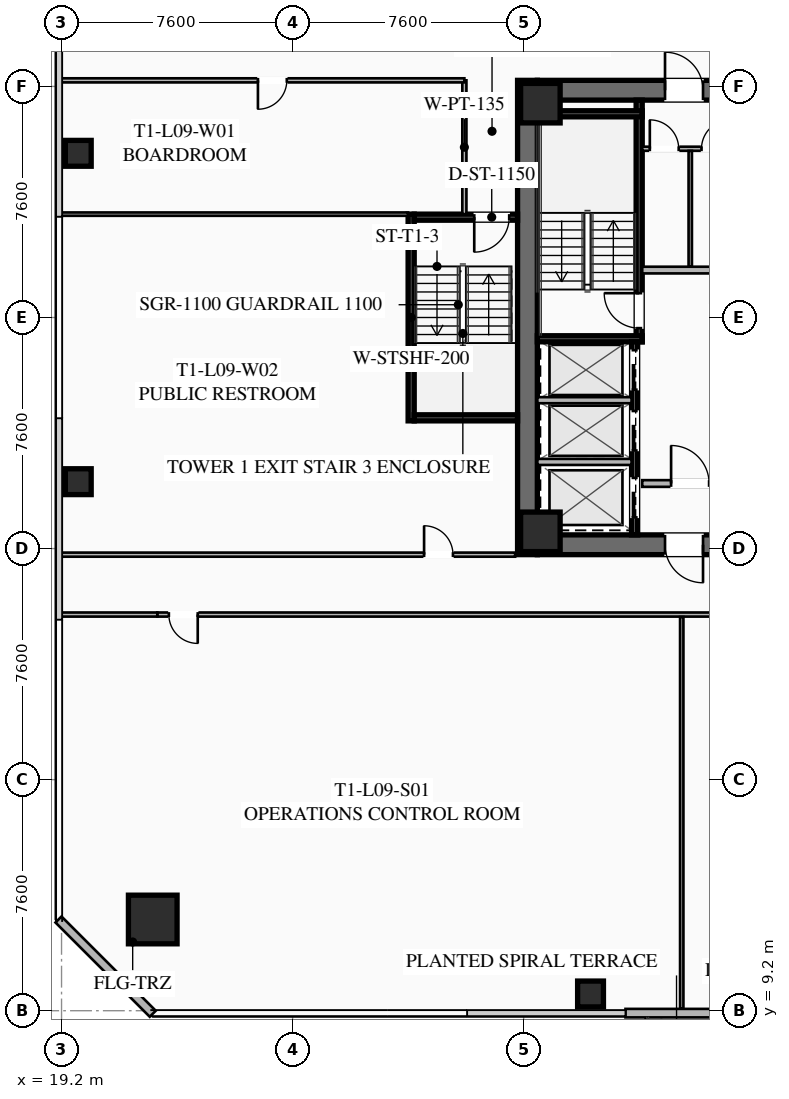
"""IFC4 building model, lengths in metres.
Left out: names, types, materials, properties, quantities, classifications, styles, units other than length and angle.
Written with IfcOpenShell. Run it as: python <this file> out.ifc"""

import sys

from ifc_helpers import new_model, si_unit, direction, frame, frame_2d, origin, origin_2d, place, context, subcontext, project, spatial, rectangle, hollow_rectangle, extrude, element, fill, save


model = new_model("IFC4")
c1 = context("Model", 3, precision=1e-05, world=origin(), true_north=direction((0.0, 1.0)))
c2 = subcontext(c1, "Body", "Model", "MODEL_VIEW")
j1 = project(units=[si_unit("LENGTHUNIT", "METRE"), si_unit("PLANEANGLEUNIT", "RADIAN")], contexts=[c1])
p1 = place(None, origin())
s1 = spatial("IfcSite", under=j1, at=p1, CompositionType="ELEMENT")
p2 = place(p1, origin())
s2 = spatial("IfcBuilding", under=s1, at=p2, CompositionType="ELEMENT")
p3 = place(p2, frame((0.0, 0.0, 38.8)))
s3 = spatial("IfcBuildingStorey", under=s2, at=p3, CompositionType="ELEMENT", Elevation=38.8)
p4 = place(p3, frame((34.525, 24.2, 0.0), z_axis=(0.0, 0.0, 1.0), x_axis=(0.0, 1.0, 0.0)))
e1 = element("IfcWall", 1, at=p4, inside=s3, PredefinedType="SHEAR", context=c2, shape_type="SweptSolid", body=[
    extrude(rectangle(XDim=15.6, YDim=0.65, at=frame_2d((7.8, 0.0))), origin(), (0.0, 0.0, 1.0), 3.55),
])
p5 = place(p3, frame((49.15, 24.525, 0.0), z_axis=(0.0, 0.0, 1.0), x_axis=(-1.0, 0.0, 0.0)))
e2 = element("IfcWall", 2, at=p5, inside=s3, PredefinedType="SHEAR", context=c2, shape_type="SweptSolid", body=[
    extrude(rectangle(XDim=14.3, YDim=0.65, at=frame_2d((7.15, 0.0))), origin(), (0.0, 0.0, 1.0), 3.55),
])
p6 = place(p5, frame((8.85, 0.0, 0.0)))
e3 = element("IfcOpeningElement", 3, at=p6, cuts=e2, PredefinedType="OPENING", context=c2, shape_type="SweptSolid", body=[
    extrude(rectangle(XDim=1.25, YDim=2.25, at=frame_2d((0.625, 1.125))), frame((0.0, 0.335, 0.0), z_axis=(0.0, -1.0, 0.0), x_axis=(1.0, 0.0, 0.0)), (0.0, 0.0, 1.0), 0.67),
])
p7 = place(p5, frame((3.8, 0.0, 0.0)))
e4 = element("IfcOpeningElement", 4, at=p7, cuts=e2, PredefinedType="OPENING", context=c2, shape_type="SweptSolid", body=[
    extrude(rectangle(XDim=1.25, YDim=2.25, at=frame_2d((0.625, 1.125))), frame((0.0, 0.335, 0.0), z_axis=(0.0, -1.0, 0.0), x_axis=(1.0, 0.0, 0.0)), (0.0, 0.0, 1.0), 0.67),
])
p8 = place(p3, frame((34.85, 39.475, 0.0), z_axis=(0.0, 0.0, 1.0), x_axis=(1.0, 0.0, 0.0)))
e5 = element("IfcWall", 5, at=p8, inside=s3, PredefinedType="SHEAR", context=c2, shape_type="SweptSolid", body=[
    extrude(rectangle(XDim=14.3, YDim=0.65, at=frame_2d((7.15, 0.0))), origin(), (0.0, 0.0, 1.0), 3.55),
])
p9 = place(p8, frame((4.2, 0.0, 0.0)))
e6 = element("IfcOpeningElement", 6, at=p9, cuts=e5, PredefinedType="OPENING", context=c2, shape_type="SweptSolid", body=[
    extrude(rectangle(XDim=1.25, YDim=2.25, at=frame_2d((0.625, 1.125))), frame((0.0, 0.335, 0.0), z_axis=(0.0, -1.0, 0.0), x_axis=(1.0, 0.0, 0.0)), (0.0, 0.0, 1.0), 0.67),
])
p10 = place(p8, frame((9.25, 0.0, 0.0)))
e7 = element("IfcOpeningElement", 7, at=p10, cuts=e5, PredefinedType="OPENING", context=c2, shape_type="SweptSolid", body=[
    extrude(rectangle(XDim=1.25, YDim=2.25, at=frame_2d((0.625, 1.125))), frame((0.0, 0.335, 0.0), z_axis=(0.0, -1.0, 0.0), x_axis=(1.0, 0.0, 0.0)), (0.0, 0.0, 1.0), 0.67),
])
for number, where, z_axis, x_axis in (
    (8, (34.95, 24.95, 0.0), (0.0, 0.0, 1.0), (1.0, 0.0, 0.0)),
    (9, (34.95, 39.05, 0.0), (0.0, 0.0, 1.0), (1.0, 0.0, 0.0)),
):
    element("IfcColumn", number, at=place(p3, frame(where, z_axis=z_axis, x_axis=x_axis)), inside=s3, PredefinedType="COLUMN", context=c2, shape_type="SweptSolid", body=[
        extrude(hollow_rectangle(XDim=1.3, YDim=1.3, WallThickness=0.05, at=origin_2d()), origin(), (0.0, 0.0, 1.0), 3.35),
    ])
p11 = place(p3, frame((22.2, 12.2, 0.0), z_axis=(0.0, 0.0, 1.0), x_axis=(1.0, 0.0, 0.0)))
e10 = element("IfcColumn", 10, at=p11, inside=s3, PredefinedType="COLUMN", context=c2, shape_type="SweptSolid", body=[
    extrude(hollow_rectangle(XDim=1.6, YDim=1.6, WallThickness=0.06, at=origin_2d()), origin(), (0.0, 0.0, 1.0), 3.35),
])
for number, where, z_axis, x_axis in (
    (11, (36.6, 9.75, 0.0), (0.0, 0.0, 1.0), (1.0, 0.0, 0.0)),
    (12, (19.75, 37.4, 0.0), (0.0, 0.0, 1.0), (1.0, 0.0, 0.0)),
    (13, (19.75, 26.6, 0.0), (0.0, 0.0, 1.0), (1.0, 0.0, 0.0)),
):
    element("IfcColumn", number, at=place(p3, frame(where, z_axis=z_axis, x_axis=x_axis)), inside=s3, PredefinedType="COLUMN", context=c2, shape_type="SweptSolid", body=[
        extrude(hollow_rectangle(XDim=0.85, YDim=0.85, WallThickness=0.035, at=origin_2d()), origin(), (0.0, 0.0, 1.0), 3.35),
    ])
p12 = place(p3, frame((46.25, 9.12, 0.0), z_axis=(0.0, 0.0, 1.0), x_axis=(-1.0, 0.0, 0.0)))
e14 = element("IfcWall", 14, at=p12, inside=s3, PredefinedType="SOLIDWALL", context=c2, shape_type="SweptSolid", body=[
    extrude(rectangle(XDim=8.5, YDim=0.28, at=frame_2d((4.25, 0.0))), origin(), (0.0, 0.0, 1.0), 3.35),
])
p13 = place(p12, frame((3.6, 0.0, 0.0)))
e15 = element("IfcOpeningElement", 15, at=p13, cuts=e14, PredefinedType="OPENING", context=c2, shape_type="SweptSolid", body=[
    extrude(rectangle(XDim=1.3, YDim=2.15, at=frame_2d((0.65, 1.075))), frame((0.0, 0.15, 0.0), z_axis=(0.0, -1.0, 0.0), x_axis=(1.0, 0.0, 0.0)), (0.0, 0.0, 1.0), 0.3),
])
p14 = place(p12, frame((1.46, 0.0, 0.85)))
e16 = element("IfcOpeningElement", 16, at=p14, cuts=e14, PredefinedType="OPENING", context=c2, shape_type="SweptSolid", body=[
    extrude(rectangle(XDim=1.8, YDim=1.92, at=frame_2d((0.9, 0.96))), frame((0.0, 0.15, 0.0), z_axis=(0.0, -1.0, 0.0), x_axis=(1.0, 0.0, 0.0)), (0.0, 0.0, 1.0), 0.3),
])
p15 = place(p3, frame((22.2, 9.1, 0.0), z_axis=(0.0, 0.0, 1.0), x_axis=(-0.707106781187, 0.707106781187, 0.0)))
e17 = element("IfcWall", 17, at=p15, inside=s3, PredefinedType="SOLIDWALL", context=c2, shape_type="SweptSolid", body=[
    extrude(rectangle(XDim=4.384, YDim=0.28, at=frame_2d((2.192, 0.0))), origin(), (0.0, 0.0, 1.0), 3.35),
])
p16 = place(p3, frame((38.2, 31.2, 0.0), z_axis=(0.0, 0.0, 1.0), x_axis=(0.0, 1.0, 0.0)))
e18 = element("IfcWall", 18, at=p16, inside=s3, PredefinedType="SHEAR", context=c2, shape_type="SweptSolid", body=[
    extrude(rectangle(XDim=7.95, YDim=0.2, at=frame_2d((3.975, 0.0))), origin(), (0.0, 0.0, 1.0), 3.35),
])
p17 = place(p16, frame((0.45, 0.0, 0.0)))
e19 = element("IfcOpeningElement", 19, at=p17, cuts=e18, PredefinedType="OPENING", context=c2, shape_type="SweptSolid", body=[
    extrude(rectangle(XDim=1.15, YDim=2.2, at=frame_2d((0.575, 1.1))), frame((0.0, 0.11, 0.0), z_axis=(0.0, -1.0, 0.0), x_axis=(1.0, 0.0, 0.0)), (0.0, 0.0, 1.0), 0.22),
])
for number, where, z_axis, x_axis in (
    (20, (34.85, 31.3, 0.0), (0.0, 0.0, 1.0), (1.0, 0.0, 0.0)),
    (21, (34.85, 38.7, 0.0), (0.0, 0.0, 1.0), (1.0, 0.0, 0.0)),
):
    element("IfcWall", number, at=place(p3, frame(where, z_axis=z_axis, x_axis=x_axis)), inside=s3, PredefinedType="SHEAR", context=c2, shape_type="SweptSolid", body=[
        extrude(rectangle(XDim=3.45, YDim=0.2, at=frame_2d((1.725, 0.0))), origin(), (0.0, 0.0, 1.0), 3.35),
    ])
p18 = place(p3, frame((38.3, 33.56, 0.0), z_axis=(0.0, 0.0, 1.0), x_axis=(1.0, 0.0, 0.0)))
e22 = element("IfcWall", 22, at=p18, inside=s3, PredefinedType="SOLIDWALL", context=c2, shape_type="SweptSolid", body=[
    extrude(rectangle(XDim=3.15, YDim=0.22, at=frame_2d((1.575, 0.0))), origin(), (0.0, 0.0, 1.0), 2.703),
])
p19 = place(p3, frame((38.3, 26.54, 0.0), z_axis=(0.0, 0.0, 1.0), x_axis=(1.0, 0.0, 0.0)))
e23 = element("IfcWall", 23, at=p19, inside=s3, PredefinedType="SOLIDWALL", context=c2, shape_type="SweptSolid", body=[
    extrude(rectangle(XDim=3.15, YDim=0.22, at=frame_2d((1.575, 0.0))), origin(), (0.0, 0.0, 1.0), 2.703),
])
p20 = place(p19, frame((0.95, 0.0, 0.0)))
e24 = element("IfcOpeningElement", 24, at=p20, cuts=e23, PredefinedType="OPENING", context=c2, shape_type="SweptSolid", body=[
    extrude(rectangle(XDim=1.25, YDim=2.25, at=frame_2d((0.625, 1.125))), frame((0.0, 0.12, 0.0), z_axis=(0.0, -1.0, 0.0), x_axis=(1.0, 0.0, 0.0)), (0.0, 0.0, 1.0), 0.24),
])
p21 = place(p3, frame((38.05, 24.85, 0.0), z_axis=(0.0, 0.0, 1.0), x_axis=(0.0, 1.0, 0.0)))
e25 = element("IfcWall", 25, at=p21, inside=s3, PredefinedType="SHEAR", context=c2, shape_type="SweptSolid", body=[
    extrude(rectangle(XDim=6.35, YDim=0.2, at=frame_2d((3.175, 0.0))), origin(), (0.0, 0.0, 1.0), 3.35),
])
p22 = place(p21, frame((4.775, 0.0, 0.0)))
e26 = element("IfcOpeningElement", 26, at=p22, cuts=e25, PredefinedType="OPENING", context=c2, shape_type="SweptSolid", body=[
    extrude(rectangle(XDim=1.3, YDim=2.25, at=frame_2d((0.65, 1.125))), frame((0.0, 0.11, 0.0), z_axis=(0.0, -1.0, 0.0), x_axis=(1.0, 0.0, 0.0)), (0.0, 0.0, 1.0), 0.22),
])
p23 = place(p21, frame((2.775, 0.0, 0.0)))
e27 = element("IfcOpeningElement", 27, at=p23, cuts=e25, PredefinedType="OPENING", context=c2, shape_type="SweptSolid", body=[
    extrude(rectangle(XDim=1.3, YDim=2.25, at=frame_2d((0.65, 1.125))), frame((0.0, 0.11, 0.0), z_axis=(0.0, -1.0, 0.0), x_axis=(1.0, 0.0, 0.0)), (0.0, 0.0, 1.0), 0.22),
])
p24 = place(p21, frame((0.575, 0.0, 0.0)))
e28 = element("IfcOpeningElement", 28, at=p24, cuts=e25, PredefinedType="OPENING", context=c2, shape_type="SweptSolid", body=[
    extrude(rectangle(XDim=1.3, YDim=2.25, at=frame_2d((0.65, 1.125))), frame((0.0, 0.11, 0.0), z_axis=(0.0, -1.0, 0.0), x_axis=(1.0, 0.0, 0.0)), (0.0, 0.0, 1.0), 0.22),
])
for number, where, z_axis, x_axis in (
    (29, (34.85, 27.25, 0.0), (0.0, 0.0, 1.0), (1.0, 0.0, 0.0)),
    (30, (34.85, 29.28, 0.0), (0.0, 0.0, 1.0), (1.0, 0.0, 0.0)),
):
    element("IfcWall", number, at=place(p3, frame(where, z_axis=z_axis, x_axis=x_axis)), inside=s3, PredefinedType="SOLIDWALL", context=c2, shape_type="SweptSolid", body=[
        extrude(rectangle(XDim=3.1, YDim=0.2, at=frame_2d((1.55, 0.0))), origin(), (0.0, 0.0, 1.0), 3.35),
    ])
p25 = place(p3, frame((38.3, 37.55, 0.0), z_axis=(0.0, 0.0, 1.0), x_axis=(1.0, 0.0, 0.0)))
e31 = element("IfcWall", 31, at=p25, inside=s3, PredefinedType="PARTITIONING", context=c2, shape_type="SweptSolid", body=[
    extrude(rectangle(XDim=3.15, YDim=0.135, at=frame_2d((1.575, 0.0))), origin(), (0.0, 0.0, 1.0), 2.703),
])
p26 = place(p25, frame((0.25, 0.0, 0.0)))
e32 = element("IfcOpeningElement", 32, at=p26, cuts=e31, PredefinedType="OPENING", context=c2, shape_type="SweptSolid", body=[
    extrude(rectangle(XDim=0.95, YDim=2.05, at=frame_2d((0.475, 1.025))), frame((0.0, 0.077, 0.0), z_axis=(0.0, -1.0, 0.0), x_axis=(1.0, 0.0, 0.0)), (0.0, 0.0, 1.0), 0.155),
])
p27 = place(p25, frame((1.95, 0.0, 0.0)))
e33 = element("IfcOpeningElement", 33, at=p27, cuts=e31, PredefinedType="OPENING", context=c2, shape_type="SweptSolid", body=[
    extrude(rectangle(XDim=0.95, YDim=2.05, at=frame_2d((0.475, 1.025))), frame((0.0, 0.077, 0.0), z_axis=(0.0, -1.0, 0.0), x_axis=(1.0, 0.0, 0.0)), (0.0, 0.0, 1.0), 0.155),
])
p28 = place(p3, frame((39.88, 33.68, 0.0), z_axis=(0.0, 0.0, 1.0), x_axis=(0.0, 1.0, 0.0)))
e34 = element("IfcWall", 34, at=p28, inside=s3, PredefinedType="PARTITIONING", context=c2, shape_type="SweptSolid", body=[
    extrude(rectangle(XDim=3.8, YDim=0.11, at=frame_2d((1.9, 0.0))), origin(), (0.0, 0.0, 1.0), 2.703),
])
p29 = place(p3, frame((30.7, 28.6, 0.0), z_axis=(0.0, 0.0, 1.0), x_axis=(0.0, 1.0, 0.0)))
e35 = element("IfcWall", 35, at=p29, inside=s3, PredefinedType="SHEAR", context=c2, shape_type="SweptSolid", body=[
    extrude(rectangle(XDim=6.8, YDim=0.2, at=frame_2d((3.4, 0.0))), origin(), (0.0, 0.0, 1.0), 3.35),
])
p30 = place(p3, frame((34.2, 35.3, 0.0), z_axis=(0.0, 0.0, 1.0), x_axis=(-1.0, 0.0, 0.0)))
e36 = element("IfcWall", 36, at=p30, inside=s3, PredefinedType="SHEAR", context=c2, shape_type="SweptSolid", body=[
    extrude(rectangle(XDim=3.4, YDim=0.2, at=frame_2d((1.7, 0.0))), origin(), (0.0, 0.0, 1.0), 3.35),
])
p31 = place(p30, frame((0.275, 0.0, 0.0)))
e37 = element("IfcOpeningElement", 37, at=p31, cuts=e36, PredefinedType="OPENING", context=c2, shape_type="SweptSolid", body=[
    extrude(rectangle(XDim=1.15, YDim=2.2, at=frame_2d((0.575, 1.1))), frame((0.0, 0.11, 0.0), z_axis=(0.0, -1.0, 0.0), x_axis=(1.0, 0.0, 0.0)), (0.0, 0.0, 1.0), 0.22),
])
p32 = place(p3, frame((30.8, 28.7, 0.0), z_axis=(0.0, 0.0, 1.0), x_axis=(1.0, 0.0, 0.0)))
e38 = element("IfcWall", 38, at=p32, inside=s3, PredefinedType="SHEAR", context=c2, shape_type="SweptSolid", body=[
    extrude(rectangle(XDim=3.4, YDim=0.2, at=frame_2d((1.7, 0.0))), origin(), (0.0, 0.0, 1.0), 3.35),
])
p33 = place(p3, frame((32.45, 35.4, 0.0), z_axis=(0.0, 0.0, 1.0), x_axis=(0.0, 1.0, 0.0)))
e39 = element("IfcWall", 39, at=p33, inside=s3, PredefinedType="PARTITIONING", context=c2, shape_type="SweptSolid", body=[
    extrude(rectangle(XDim=4.4, YDim=0.135, at=frame_2d((2.2, 0.0))), origin(), (0.0, 0.0, 1.0), 2.703),
])
p34 = place(p3, frame((53.1, 22.23, 0.0), z_axis=(0.0, 0.0, 1.0), x_axis=(-1.0, 0.0, 0.0)))
e40 = element("IfcWall", 40, at=p34, inside=s3, PredefinedType="PARTITIONING", context=c2, shape_type="SweptSolid", body=[
    extrude(rectangle(XDim=30.75, YDim=0.135, at=frame_2d((15.375, 0.0))), origin(), (0.0, 0.0, 1.0), 2.703),
])
p35 = place(p34, frame((29.42, 0.0, 0.0)))
e41 = element("IfcOpeningElement", 41, at=p35, cuts=e40, PredefinedType="OPENING", context=c2, shape_type="SweptSolid", body=[
    extrude(rectangle(XDim=0.95, YDim=2.05, at=frame_2d((0.475, 1.025))), frame((0.0, 0.077, 0.0), z_axis=(0.0, -1.0, 0.0), x_axis=(1.0, 0.0, 0.0)), (0.0, 0.0, 1.0), 0.155),
])
p36 = place(p34, frame((10.388, 0.0, 0.0)))
e42 = element("IfcOpeningElement", 42, at=p36, cuts=e40, PredefinedType="OPENING", context=c2, shape_type="SweptSolid", body=[
    extrude(rectangle(XDim=0.95, YDim=2.05, at=frame_2d((0.475, 1.025))), frame((0.0, 0.077, 0.0), z_axis=(0.0, -1.0, 0.0), x_axis=(1.0, 0.0, 0.0)), (0.0, 0.0, 1.0), 0.155),
])
p37 = place(p34, frame((0.38, 0.0, 0.0)))
e43 = element("IfcOpeningElement", 43, at=p37, cuts=e40, PredefinedType="OPENING", context=c2, shape_type="SweptSolid", body=[
    extrude(rectangle(XDim=0.95, YDim=2.05, at=frame_2d((0.475, 1.025))), frame((0.0, 0.077, 0.0), z_axis=(0.0, -1.0, 0.0), x_axis=(1.0, 0.0, 0.0)), (0.0, 0.0, 1.0), 0.155),
])
p38 = place(p3, frame((19.12, 22.23, 0.0), z_axis=(0.0, 0.0, 1.0), x_axis=(1.0, 0.0, 0.0)))
e44 = element("IfcWall", 44, at=p38, inside=s3, PredefinedType="PARTITIONING", context=c2, shape_type="SweptSolid", body=[
    extrude(rectangle(XDim=3.23, YDim=0.135, at=frame_2d((1.615, 0.0))), origin(), (0.0, 0.0, 1.0), 2.703),
])
p39 = place(p3, frame((39.6, 9.27, 0.0), z_axis=(0.0, 0.0, 1.0), x_axis=(0.0, 1.0, 0.0)))
e45 = element("IfcWall", 45, at=p39, inside=s3, PredefinedType="PARTITIONING", context=c2, shape_type="SweptSolid", body=[
    extrude(rectangle(XDim=12.88, YDim=0.11, at=frame_2d((6.44, 0.0))), origin(), (0.0, 0.0, 1.0), 2.703),
])
p40 = place(p3, frame((32.45, 39.8, 0.0), z_axis=(0.0, 0.0, 1.0), x_axis=(-1.0, 0.0, 0.0)))
e46 = element("IfcWall", 46, at=p40, inside=s3, PredefinedType="PARTITIONING", context=c2, shape_type="SweptSolid", body=[
    extrude(rectangle(XDim=13.33, YDim=0.135, at=frame_2d((6.665, 0.0))), origin(), (0.0, 0.0, 1.0), 2.703),
])
p41 = place(p40, frame((5.84, 0.0, 0.0)))
e47 = element("IfcOpeningElement", 47, at=p41, cuts=e46, PredefinedType="OPENING", context=c2, shape_type="SweptSolid", body=[
    extrude(rectangle(XDim=0.95, YDim=2.05, at=frame_2d((0.475, 1.025))), frame((0.0, 0.077, 0.0), z_axis=(0.0, -1.0, 0.0), x_axis=(1.0, 0.0, 0.0)), (0.0, 0.0, 1.0), 0.155),
])
p42 = place(p3, frame((19.12, 24.2, 0.0), z_axis=(0.0, 0.0, 1.0), x_axis=(1.0, 0.0, 0.0)))
e48 = element("IfcWall", 48, at=p42, inside=s3, PredefinedType="PARTITIONING", context=c2, shape_type="SweptSolid", body=[
    extrude(rectangle(XDim=15.0, YDim=0.135, at=frame_2d((7.5, 0.0))), origin(), (0.0, 0.0, 1.0), 2.703),
])
p43 = place(p42, frame((12.005, 0.0, 0.0)))
e49 = element("IfcOpeningElement", 49, at=p43, cuts=e48, PredefinedType="OPENING", context=c2, shape_type="SweptSolid", body=[
    extrude(rectangle(XDim=0.95, YDim=2.05, at=frame_2d((0.475, 1.025))), frame((0.0, 0.077, 0.0), z_axis=(0.0, -1.0, 0.0), x_axis=(1.0, 0.0, 0.0)), (0.0, 0.0, 1.0), 0.155),
])
p44 = place(p3, frame((30.6, 35.4, 0.0), z_axis=(0.0, 0.0, 1.0), x_axis=(-1.0, 0.0, 0.0)))
e50 = element("IfcWall", 50, at=p44, inside=s3, PredefinedType="PARTITIONING", context=c2, shape_type="SweptSolid", body=[
    extrude(rectangle(XDim=11.48, YDim=0.11, at=frame_2d((5.74, 0.0))), origin(), (0.0, 0.0, 1.0), 2.703),
])
p45 = place(p9, origin())
e51 = element("IfcDoor", 51, at=p45, inside=s3, OperationType="SINGLE_SWING_LEFT", PredefinedType="DOOR", context=c2, shape_type="SweptSolid", body=[
    extrude(rectangle(XDim=1.25, YDim=2.25, at=frame_2d((0.625, 1.125))), frame((0.0, 0.025, 0.0), z_axis=(0.0, -1.0, 0.0), x_axis=(1.0, 0.0, 0.0)), (0.0, 0.0, 1.0), 0.05),
])
fill(e6, e51)
p46 = place(p6, origin())
e52 = element("IfcDoor", 52, at=p46, inside=s3, OperationType="SINGLE_SWING_LEFT", PredefinedType="DOOR", context=c2, shape_type="SweptSolid", body=[
    extrude(rectangle(XDim=1.25, YDim=2.25, at=frame_2d((0.625, 1.125))), frame((0.0, 0.025, 0.0), z_axis=(0.0, -1.0, 0.0), x_axis=(1.0, 0.0, 0.0)), (0.0, 0.0, 1.0), 0.05),
])
fill(e3, e52)
p47 = place(p17, origin())
e53 = element("IfcDoor", 53, at=p47, inside=s3, OperationType="SINGLE_SWING_RIGHT", PredefinedType="DOOR", context=c2, shape_type="SweptSolid", body=[
    extrude(rectangle(XDim=1.15, YDim=2.2, at=frame_2d((0.575, 1.1))), frame((0.0, 0.025, 0.0), z_axis=(0.0, -1.0, 0.0), x_axis=(1.0, 0.0, 0.0)), (0.0, 0.0, 1.0), 0.05),
])
fill(e19, e53)
p48 = place(p20, origin())
e54 = element("IfcDoor", 54, at=p48, inside=s3, OperationType="SINGLE_SWING_LEFT", PredefinedType="DOOR", context=c2, shape_type="SweptSolid", body=[
    extrude(rectangle(XDim=1.25, YDim=2.25, at=frame_2d((0.625, 1.125))), frame((0.0, 0.025, 0.0), z_axis=(0.0, -1.0, 0.0), x_axis=(1.0, 0.0, 0.0)), (0.0, 0.0, 1.0), 0.05),
])
fill(e24, e54)
p49 = place(p26, origin())
e55 = element("IfcDoor", 55, at=p49, inside=s3, OperationType="SINGLE_SWING_LEFT", PredefinedType="DOOR", context=c2, shape_type="SweptSolid", body=[
    extrude(rectangle(XDim=0.95, YDim=2.05, at=frame_2d((0.475, 1.025))), frame((0.0, 0.025, 0.0), z_axis=(0.0, -1.0, 0.0), x_axis=(1.0, 0.0, 0.0)), (0.0, 0.0, 1.0), 0.05),
])
fill(e32, e55)
p50 = place(p27, origin())
e56 = element("IfcDoor", 56, at=p50, inside=s3, OperationType="SINGLE_SWING_RIGHT", PredefinedType="DOOR", context=c2, shape_type="SweptSolid", body=[
    extrude(rectangle(XDim=0.95, YDim=2.05, at=frame_2d((0.475, 1.025))), frame((0.0, 0.025, 0.0), z_axis=(0.0, -1.0, 0.0), x_axis=(1.0, 0.0, 0.0)), (0.0, 0.0, 1.0), 0.05),
])
fill(e33, e56)
p51 = place(p31, origin())
e57 = element("IfcDoor", 57, at=p51, inside=s3, OperationType="SINGLE_SWING_RIGHT", PredefinedType="DOOR", context=c2, shape_type="SweptSolid", body=[
    extrude(rectangle(XDim=1.15, YDim=2.2, at=frame_2d((0.575, 1.1))), frame((0.0, 0.025, 0.0), z_axis=(0.0, -1.0, 0.0), x_axis=(1.0, 0.0, 0.0)), (0.0, 0.0, 1.0), 0.05),
])
fill(e37, e57)
p52 = place(p35, origin())
e58 = element("IfcDoor", 58, at=p52, inside=s3, OperationType="SINGLE_SWING_LEFT", PredefinedType="DOOR", context=c2, shape_type="SweptSolid", body=[
    extrude(rectangle(XDim=0.95, YDim=2.05, at=frame_2d((0.475, 1.025))), frame((0.0, 0.025, 0.0), z_axis=(0.0, -1.0, 0.0), x_axis=(1.0, 0.0, 0.0)), (0.0, 0.0, 1.0), 0.05),
])
fill(e41, e58)
p53 = place(p41, origin())
e59 = element("IfcDoor", 59, at=p53, inside=s3, OperationType="SINGLE_SWING_RIGHT", PredefinedType="DOOR", context=c2, shape_type="SweptSolid", body=[
    extrude(rectangle(XDim=0.95, YDim=2.05, at=frame_2d((0.475, 1.025))), frame((0.0, 0.025, 0.0), z_axis=(0.0, -1.0, 0.0), x_axis=(1.0, 0.0, 0.0)), (0.0, 0.0, 1.0), 0.05),
])
fill(e47, e59)
p54 = place(p43, origin())
e60 = element("IfcDoor", 60, at=p54, inside=s3, OperationType="SINGLE_SWING_LEFT", PredefinedType="DOOR", context=c2, shape_type="SweptSolid", body=[
    extrude(rectangle(XDim=0.95, YDim=2.05, at=frame_2d((0.475, 1.025))), frame((0.0, 0.025, 0.0), z_axis=(0.0, -1.0, 0.0), x_axis=(1.0, 0.0, 0.0)), (0.0, 0.0, 1.0), 0.05),
])
fill(e49, e60)
p55 = place(p22, origin())
e61 = element("IfcDoor", 61, at=p55, inside=s3, OperationType="SLIDING_TO_LEFT", PredefinedType="DOOR", context=c2, shape_type="SweptSolid", body=[
    extrude(rectangle(XDim=1.3, YDim=2.25, at=frame_2d((0.65, 1.125))), frame((0.0, 0.025, 0.0), z_axis=(0.0, -1.0, 0.0), x_axis=(1.0, 0.0, 0.0)), (0.0, 0.0, 1.0), 0.05),
])
fill(e26, e61)
p56 = place(p23, origin())
e62 = element("IfcDoor", 62, at=p56, inside=s3, OperationType="SLIDING_TO_LEFT", PredefinedType="DOOR", context=c2, shape_type="SweptSolid", body=[
    extrude(rectangle(XDim=1.3, YDim=2.25, at=frame_2d((0.65, 1.125))), frame((0.0, 0.025, 0.0), z_axis=(0.0, -1.0, 0.0), x_axis=(1.0, 0.0, 0.0)), (0.0, 0.0, 1.0), 0.05),
])
fill(e27, e62)
p57 = place(p24, origin())
e63 = element("IfcDoor", 63, at=p57, inside=s3, OperationType="SLIDING_TO_LEFT", PredefinedType="DOOR", context=c2, shape_type="SweptSolid", body=[
    extrude(rectangle(XDim=1.3, YDim=2.25, at=frame_2d((0.65, 1.125))), frame((0.0, 0.025, 0.0), z_axis=(0.0, -1.0, 0.0), x_axis=(1.0, 0.0, 0.0)), (0.0, 0.0, 1.0), 0.05),
])
fill(e28, e63)
save(model, sys.argv[1])
